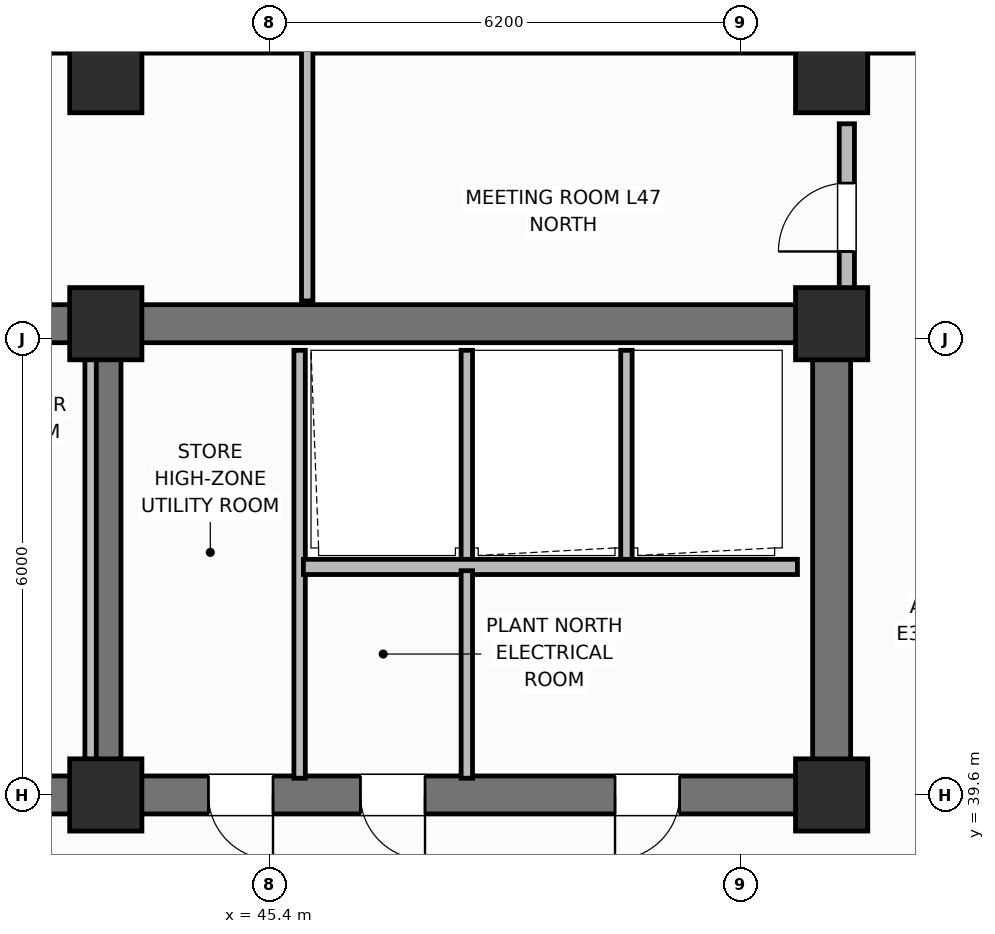
"""IFC4 building model, lengths in metres.
Left out: names, types, materials, properties, quantities, classifications, styles, units other than length and angle.
Written with IfcOpenShell. Run it as: python <this file> out.ifc"""

import sys

from ifc_helpers import new_model, si_unit, direction, frame, frame_2d, origin, origin_2d, place, context, subcontext, project, spatial, rectangle, extrude, element, fill, save


model = new_model("IFC4")
c1 = context("Model", 3, precision=1e-05, world=origin(), true_north=direction((0.0, 1.0)))
c2 = subcontext(c1, "Body", "Model", "MODEL_VIEW")
j1 = project(units=[si_unit("LENGTHUNIT", "METRE"), si_unit("PLANEANGLEUNIT", "RADIAN")], contexts=[c1])
p1 = place(None, origin())
s1 = spatial("IfcSite", under=j1, at=p1, CompositionType="ELEMENT")
p2 = place(p1, origin())
s2 = spatial("IfcBuilding", under=s1, at=p2, CompositionType="ELEMENT")
p3 = place(p2, frame((0.0, 0.0, 188.5)))
s3 = spatial("IfcBuildingStorey", under=s2, at=p3, CompositionType="ELEMENT", Elevation=188.5)
p4 = place(p3, frame((25.6, 45.8, 0.0), z_axis=(0.0, 0.0, 1.0), x_axis=(1.0, 0.0, 0.0)))
e1 = element("IfcWall", 1, at=p4, inside=s3, PredefinedType="SHEAR", context=c2, shape_type="SweptSolid", body=[
    extrude(rectangle(XDim=27.2, YDim=0.5, at=frame_2d((13.6, 0.0))), origin(), (0.0, 0.0, 1.0), 3.7),
])
p5 = place(p3, frame((52.8, 39.85, 0.0), z_axis=(0.0, 0.0, 1.0), x_axis=(0.0, 1.0, 0.0)))
e2 = element("IfcWall", 2, at=p5, inside=s3, PredefinedType="SHEAR", context=c2, shape_type="SweptSolid", body=[
    extrude(rectangle(XDim=5.7, YDim=0.5, at=frame_2d((2.85, 0.0))), origin(), (0.0, 0.0, 1.0), 3.7),
])
p6 = place(p3, frame((52.8, 39.6, 0.0), z_axis=(0.0, 0.0, 1.0), x_axis=(-1.0, 0.0, 0.0)))
e3 = element("IfcWall", 3, at=p6, inside=s3, PredefinedType="SHEAR", context=c2, shape_type="SweptSolid", body=[
    extrude(rectangle(XDim=27.2, YDim=0.5, at=frame_2d((13.6, 0.0))), origin(), (0.0, 0.0, 1.0), 3.7),
])
p7 = place(p6, frame((24.3, 0.0, 0.0)))
e4 = element("IfcOpeningElement", 4, at=p7, cuts=e3, PredefinedType="OPENING", context=c2, shape_type="SweptSolid", body=[
    extrude(rectangle(XDim=1.1, YDim=2.15, at=frame_2d((0.55, 1.075))), frame((0.0, 0.26, 0.0), z_axis=(0.0, -1.0, 0.0), x_axis=(1.0, 0.0, 0.0)), (0.0, 0.0, 1.0), 0.52),
])
p8 = place(p6, frame((21.85, 0.0, 0.0)))
e5 = element("IfcOpeningElement", 5, at=p8, cuts=e3, PredefinedType="OPENING", context=c2, shape_type="SweptSolid", body=[
    extrude(rectangle(XDim=0.85, YDim=2.1, at=frame_2d((0.425, 1.05))), frame((0.0, 0.26, 0.0), z_axis=(0.0, -1.0, 0.0), x_axis=(1.0, 0.0, 0.0)), (0.0, 0.0, 1.0), 0.52),
])
p9 = place(p6, frame((19.85, 0.0, 0.0)))
e6 = element("IfcOpeningElement", 6, at=p9, cuts=e3, PredefinedType="OPENING", context=c2, shape_type="SweptSolid", body=[
    extrude(rectangle(XDim=0.85, YDim=2.1, at=frame_2d((0.425, 1.05))), frame((0.0, 0.26, 0.0), z_axis=(0.0, -1.0, 0.0), x_axis=(1.0, 0.0, 0.0)), (0.0, 0.0, 1.0), 0.52),
])
p10 = place(p6, frame((15.1, 0.0, 0.0)))
e7 = element("IfcOpeningElement", 7, at=p10, cuts=e3, PredefinedType="OPENING", context=c2, shape_type="SweptSolid", body=[
    extrude(rectangle(XDim=1.2, YDim=2.15, at=frame_2d((0.6, 1.075))), frame((0.0, 0.26, 0.0), z_axis=(0.0, -1.0, 0.0), x_axis=(1.0, 0.0, 0.0)), (0.0, 0.0, 1.0), 0.52),
])
p11 = place(p6, frame((12.6, 0.0, 0.0)))
e8 = element("IfcOpeningElement", 8, at=p11, cuts=e3, PredefinedType="OPENING", context=c2, shape_type="SweptSolid", body=[
    extrude(rectangle(XDim=0.85, YDim=2.1, at=frame_2d((0.425, 1.05))), frame((0.0, 0.26, 0.0), z_axis=(0.0, -1.0, 0.0), x_axis=(1.0, 0.0, 0.0)), (0.0, 0.0, 1.0), 0.52),
])
p12 = place(p6, frame((10.85, 0.0, 0.0)))
e9 = element("IfcOpeningElement", 9, at=p12, cuts=e3, PredefinedType="OPENING", context=c2, shape_type="SweptSolid", body=[
    extrude(rectangle(XDim=0.85, YDim=2.1, at=frame_2d((0.425, 1.05))), frame((0.0, 0.26, 0.0), z_axis=(0.0, -1.0, 0.0), x_axis=(1.0, 0.0, 0.0)), (0.0, 0.0, 1.0), 0.52),
])
p13 = place(p6, frame((7.35, 0.0, 0.0)))
e10 = element("IfcOpeningElement", 10, at=p13, cuts=e3, PredefinedType="OPENING", context=c2, shape_type="SweptSolid", body=[
    extrude(rectangle(XDim=0.85, YDim=2.1, at=frame_2d((0.425, 1.05))), frame((0.0, 0.26, 0.0), z_axis=(0.0, -1.0, 0.0), x_axis=(1.0, 0.0, 0.0)), (0.0, 0.0, 1.0), 0.52),
])
p14 = place(p6, frame((5.35, 0.0, 0.0)))
e11 = element("IfcOpeningElement", 11, at=p14, cuts=e3, PredefinedType="OPENING", context=c2, shape_type="SweptSolid", body=[
    extrude(rectangle(XDim=0.85, YDim=2.1, at=frame_2d((0.425, 1.05))), frame((0.0, 0.26, 0.0), z_axis=(0.0, -1.0, 0.0), x_axis=(1.0, 0.0, 0.0)), (0.0, 0.0, 1.0), 0.52),
])
p15 = place(p6, frame((2.0, 0.0, 0.0)))
e12 = element("IfcOpeningElement", 12, at=p15, cuts=e3, PredefinedType="OPENING", context=c2, shape_type="SweptSolid", body=[
    extrude(rectangle(XDim=0.85, YDim=2.1, at=frame_2d((0.425, 1.05))), frame((0.0, 0.26, 0.0), z_axis=(0.0, -1.0, 0.0), x_axis=(1.0, 0.0, 0.0)), (0.0, 0.0, 1.0), 0.52),
])
p16 = place(p3, frame((43.25, 39.85, 0.0), z_axis=(0.0, 0.0, 1.0), x_axis=(0.0, 1.0, 0.0)))
e13 = element("IfcWall", 13, at=p16, inside=s3, PredefinedType="SHEAR", context=c2, shape_type="SweptSolid", body=[
    extrude(rectangle(XDim=5.7, YDim=0.4, at=frame_2d((2.85, 0.0))), origin(), (0.0, 0.0, 1.0), 3.7),
])
for number, where, z_axis, x_axis in (
    (14, (43.25, 39.6, 0.0), (0.0, 0.0, 1.0), (1.0, 0.0, 0.0)),
    (15, (43.25, 45.8, 0.0), (0.0, 0.0, 1.0), (1.0, 0.0, 0.0)),
    (16, (52.8, 39.6, 0.0), (0.0, 0.0, 1.0), (1.0, 0.0, 0.0)),
    (17, (52.8, 45.8, 0.0), (0.0, 0.0, 1.0), (1.0, 0.0, 0.0)),
    (18, (43.25, 49.05, 0.0), (0.0, 0.0, 1.0), (1.0, 0.0, 0.0)),
    (19, (52.8, 49.05, 0.0), (0.0, 0.0, 1.0), (1.0, 0.0, 0.0)),
):
    element("IfcColumn", number, at=place(p3, frame(where, z_axis=z_axis, x_axis=x_axis)), inside=s3, PredefinedType="COLUMN", context=c2, shape_type="SweptSolid", body=[
        extrude(rectangle(XDim=0.95, YDim=0.95, at=origin_2d()), origin(), (0.0, 0.0, 1.0), 3.7),
    ])
p17 = place(p3, frame((58.2, 49.53, 0.0), z_axis=(0.0, 0.0, 1.0), x_axis=(-1.0, 0.0, 0.0)))
e20 = element("IfcWall", 20, at=p17, inside=s3, PredefinedType="SOLIDWALL", context=c2, shape_type="SweptSolid", body=[
    extrude(rectangle(XDim=15.8, YDim=0.34, at=frame_2d((7.9, 0.0))), origin(), (0.0, 0.0, 1.0), 2.72),
])
p18 = place(p17, frame((8.812, 0.0, 0.75)))
e21 = element("IfcOpeningElement", 21, at=p18, cuts=e20, PredefinedType="OPENING", context=c2, shape_type="SweptSolid", body=[
    extrude(rectangle(XDim=1.8, YDim=1.85, at=frame_2d((0.9, 0.925))), frame((0.0, 0.18, 0.0), z_axis=(0.0, -1.0, 0.0), x_axis=(1.0, 0.0, 0.0)), (0.0, 0.0, 1.0), 0.36),
])
for number, where, z_axis, x_axis in (
    (22, (43.05, 39.82, 0.0), (0.0, 0.0, 1.0), (0.0, 1.0, 0.0)),
    (23, (45.8, 39.82, 0.0), (0.0, 0.0, 1.0), (0.0, 1.0, 0.0)),
):
    element("IfcWall", number, at=place(p3, frame(where, z_axis=z_axis, x_axis=x_axis)), inside=s3, PredefinedType="PARTITIONING", context=c2, shape_type="SweptSolid", body=[
        extrude(rectangle(XDim=5.63, YDim=0.15, at=frame_2d((2.815, 0.0))), origin(), (0.0, 0.0, 1.0), 2.55),
    ])
for number, where, z_axis, x_axis in (
    (24, (48.0, 42.65, 0.0), (0.0, 0.0, 1.0), (0.0, 1.0, 0.0)),
    (25, (50.1, 42.65, 0.0), (0.0, 0.0, 1.0), (0.0, 1.0, 0.0)),
):
    element("IfcWall", number, at=place(p3, frame(where, z_axis=z_axis, x_axis=x_axis)), inside=s3, PredefinedType="PARTITIONING", context=c2, shape_type="SweptSolid", body=[
        extrude(rectangle(XDim=2.8, YDim=0.15, at=frame_2d((1.4, 0.0))), origin(), (0.0, 0.0, 1.0), 2.55),
    ])
p19 = place(p3, frame((52.35, 42.6, 0.0), z_axis=(0.0, 0.0, 1.0), x_axis=(-1.0, 0.0, 0.0)))
e26 = element("IfcWall", 26, at=p19, inside=s3, PredefinedType="PARTITIONING", context=c2, shape_type="SweptSolid", body=[
    extrude(rectangle(XDim=6.5, YDim=0.2, at=frame_2d((3.25, 0.0))), origin(), (0.0, 0.0, 1.0), 2.55),
])
p20 = place(p3, frame((48.0, 39.82, 0.0), z_axis=(0.0, 0.0, 1.0), x_axis=(0.0, 1.0, 0.0)))
e27 = element("IfcWall", 27, at=p20, inside=s3, PredefinedType="PARTITIONING", context=c2, shape_type="SweptSolid", body=[
    extrude(rectangle(XDim=2.73, YDim=0.15, at=frame_2d((1.365, 0.0))), origin(), (0.0, 0.0, 1.0), 2.55),
])
p21 = place(p3, frame((45.9, 46.1, 0.0), z_axis=(0.0, 0.0, 1.0), x_axis=(0.0, 1.0, 0.0)))
e28 = element("IfcWall", 28, at=p21, inside=s3, PredefinedType="PARTITIONING", context=c2, shape_type="SweptSolid", body=[
    extrude(rectangle(XDim=3.43, YDim=0.15, at=frame_2d((1.715, 0.0))), origin(), (0.0, 0.0, 1.0), 2.55),
])
p22 = place(p3, frame((53.0, 46.1, 0.0), z_axis=(0.0, 0.0, 1.0), x_axis=(0.0, 1.0, 0.0)))
e29 = element("IfcWall", 29, at=p22, inside=s3, PredefinedType="PARTITIONING", context=c2, shape_type="SweptSolid", body=[
    extrude(rectangle(XDim=2.33, YDim=0.2, at=frame_2d((1.165, 0.0))), origin(), (0.0, 0.0, 1.0), 2.55),
])
p23 = place(p22, frame((0.65, 0.0, 0.0)))
e30 = element("IfcOpeningElement", 30, at=p23, cuts=e29, PredefinedType="OPENING", context=c2, shape_type="SweptSolid", body=[
    extrude(rectangle(XDim=0.9, YDim=2.1, at=frame_2d((0.45, 1.05))), frame((0.0, 0.11, 0.0), z_axis=(0.0, -1.0, 0.0), x_axis=(1.0, 0.0, 0.0)), (0.0, 0.0, 1.0), 0.22),
])
p24 = place(p23, origin())
e31 = element("IfcDoor", 31, at=p24, inside=s3, OperationType="SINGLE_SWING_LEFT", PredefinedType="DOOR", context=c2, shape_type="SweptSolid", body=[
    extrude(rectangle(XDim=0.9, YDim=2.1, at=frame_2d((0.45, 1.05))), frame((0.0, 0.025, 0.0), z_axis=(0.0, -1.0, 0.0), x_axis=(1.0, 0.0, 0.0)), (0.0, 0.0, 1.0), 0.05),
])
fill(e30, e31)
p25 = place(p13, origin())
e32 = element("IfcDoor", 32, at=p25, inside=s3, OperationType="SINGLE_SWING_LEFT", PredefinedType="DOOR", context=c2, shape_type="SweptSolid", body=[
    extrude(rectangle(XDim=0.85, YDim=2.1, at=frame_2d((0.425, 1.05))), frame((0.0, 0.025, 0.0), z_axis=(0.0, -1.0, 0.0), x_axis=(1.0, 0.0, 0.0)), (0.0, 0.0, 1.0), 0.05),
])
fill(e10, e32)
p26 = place(p14, origin())
e33 = element("IfcDoor", 33, at=p26, inside=s3, OperationType="SINGLE_SWING_LEFT", PredefinedType="DOOR", context=c2, shape_type="SweptSolid", body=[
    extrude(rectangle(XDim=0.85, YDim=2.1, at=frame_2d((0.425, 1.05))), frame((0.0, 0.025, 0.0), z_axis=(0.0, -1.0, 0.0), x_axis=(1.0, 0.0, 0.0)), (0.0, 0.0, 1.0), 0.05),
])
fill(e11, e33)
p27 = place(p15, origin())
e34 = element("IfcDoor", 34, at=p27, inside=s3, OperationType="SINGLE_SWING_RIGHT", PredefinedType="DOOR", context=c2, shape_type="SweptSolid", body=[
    extrude(rectangle(XDim=0.85, YDim=2.1, at=frame_2d((0.425, 1.05))), frame((0.0, 0.025, 0.0), z_axis=(0.0, -1.0, 0.0), x_axis=(1.0, 0.0, 0.0)), (0.0, 0.0, 1.0), 0.05),
])
fill(e12, e34)
save(model, sys.argv[1])
